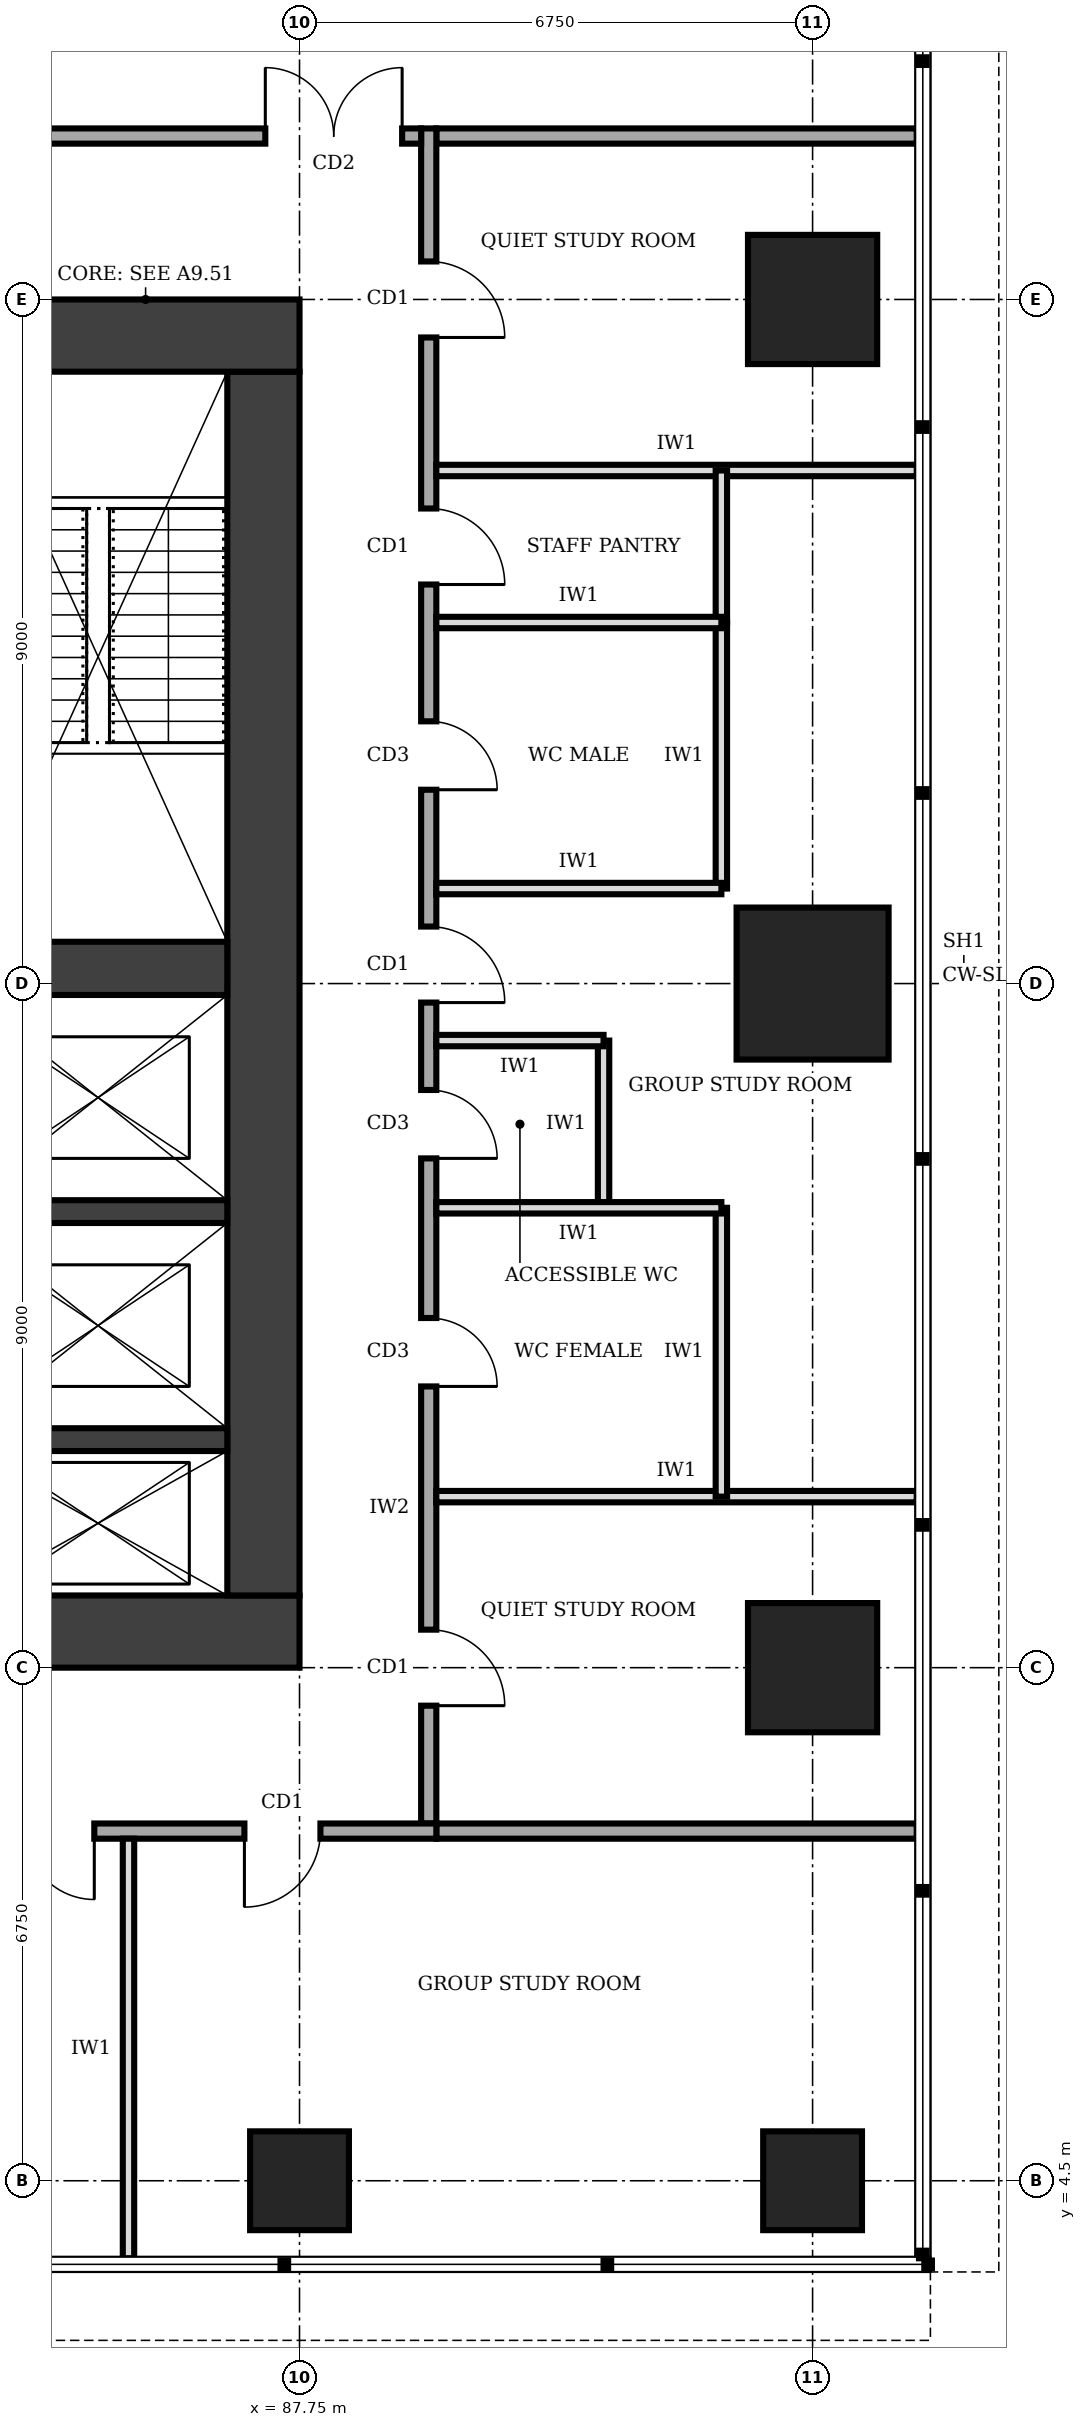
"""IFC4 building model, lengths in metres.
Left out: names, types, materials, properties, quantities, classifications, styles, units other than length and angle.
Written with IfcOpenShell. Run it as: python <this file> out.ifc"""

import sys

from ifc_helpers import new_model, si_unit, direction, frame, frame_2d, origin, origin_2d, place, context, subcontext, project, spatial, rectangle, extrude, element, fill, save


model = new_model("IFC4")
c1 = context("Model", 3, precision=1e-05, world=origin(), true_north=direction((0.0, 1.0)))
c2 = subcontext(c1, "Body", "Model", "MODEL_VIEW")
j1 = project(units=[si_unit("LENGTHUNIT", "METRE"), si_unit("PLANEANGLEUNIT", "RADIAN")], contexts=[c1])
p1 = place(None, origin())
s1 = spatial("IfcSite", under=j1, at=p1, CompositionType="ELEMENT")
p2 = place(p1, origin())
s2 = spatial("IfcBuilding", under=s1, at=p2, CompositionType="ELEMENT")
p3 = place(p2, frame((0.0, 0.0, 233.0)))
s3 = spatial("IfcBuildingStorey", under=s2, at=p3, CompositionType="ELEMENT", Elevation=233.0)
p4 = place(p3, frame((74.25, 11.725, 0.0), z_axis=(0.0, 0.0, 1.0), x_axis=(1.0, 0.0, 0.0)))
e1 = element("IfcWall", 1, at=p4, inside=s3, PredefinedType="SHEAR", context=c2, shape_type="SweptSolid", body=[
    extrude(rectangle(XDim=13.5, YDim=0.95, at=frame_2d((6.75, 0.0))), origin(), (0.0, 0.0, 1.0), 4.0),
])
p5 = place(p4, frame((4.75, 0.0, 0.0)))
e2 = element("IfcOpeningElement", 2, at=p5, cuts=e1, PredefinedType="OPENING", context=c2, shape_type="SweptSolid", body=[
    extrude(rectangle(XDim=1.0, YDim=2.1, at=frame_2d((0.5, 1.05))), frame((0.0, 0.485, 0.0), z_axis=(0.0, -1.0, 0.0), x_axis=(1.0, 0.0, 0.0)), (0.0, 0.0, 1.0), 0.97),
])
p6 = place(p3, frame((87.275, 12.2, 0.0), z_axis=(0.0, 0.0, 1.0), x_axis=(0.0, 1.0, 0.0)))
e3 = element("IfcWall", 3, at=p6, inside=s3, PredefinedType="SHEAR", context=c2, shape_type="SweptSolid", body=[
    extrude(rectangle(XDim=16.1, YDim=0.95, at=frame_2d((8.05, 0.0))), origin(), (0.0, 0.0, 1.0), 4.0),
])
p7 = place(p3, frame((87.75, 28.775, 0.0), z_axis=(0.0, 0.0, 1.0), x_axis=(-1.0, 0.0, 0.0)))
e4 = element("IfcWall", 4, at=p7, inside=s3, PredefinedType="SHEAR", context=c2, shape_type="SweptSolid", body=[
    extrude(rectangle(XDim=13.5, YDim=0.95, at=frame_2d((6.75, 0.0))), origin(), (0.0, 0.0, 1.0), 4.0),
])
p8 = place(p7, frame((4.75, 0.0, 0.0)))
e5 = element("IfcOpeningElement", 5, at=p8, cuts=e4, PredefinedType="OPENING", context=c2, shape_type="SweptSolid", body=[
    extrude(rectangle(XDim=1.8, YDim=2.1, at=frame_2d((0.9, 1.05))), frame((0.0, 0.485, 0.0), z_axis=(0.0, -1.0, 0.0), x_axis=(1.0, 0.0, 0.0)), (0.0, 0.0, 1.0), 0.97),
])
for number, where, z_axis, x_axis in (
    (6, (83.4, 14.25, 0.0), (0.0, 0.0, 1.0), (1.0, 0.0, 0.0)),
    (7, (83.4, 17.25, 0.0), (0.0, 0.0, 1.0), (1.0, 0.0, 0.0)),
):
    element("IfcWall", number, at=place(p3, frame(where, z_axis=z_axis, x_axis=x_axis)), inside=s3, PredefinedType="SHEAR", context=c2, shape_type="SweptSolid", body=[
        extrude(rectangle(XDim=3.4, YDim=0.3, at=frame_2d((1.7, 0.0))), origin(), (0.0, 0.0, 1.0), 4.0),
    ])
p9 = place(p3, frame((83.4, 20.45, 0.0), z_axis=(0.0, 0.0, 1.0), x_axis=(1.0, 0.0, 0.0)))
e8 = element("IfcWall", 8, at=p9, inside=s3, PredefinedType="SHEAR", context=c2, shape_type="SweptSolid", body=[
    extrude(rectangle(XDim=3.4, YDim=0.7, at=frame_2d((1.7, 0.0))), origin(), (0.0, 0.0, 1.0), 4.0),
])
for number, where, z_axis, x_axis in (
    (9, (87.75, 4.5, 0.0), (0.0, 0.0, 1.0), (1.0, 0.0, 0.0)),
    (10, (94.5, 4.5, 0.0), (0.0, 0.0, 1.0), (1.0, 0.0, 0.0)),
):
    element("IfcColumn", number, at=place(p3, frame(where, z_axis=z_axis, x_axis=x_axis)), inside=s3, PredefinedType="COLUMN", context=c2, shape_type="SweptSolid", body=[
        extrude(rectangle(XDim=1.3, YDim=1.3, at=origin_2d()), origin(), (0.0, 0.0, 1.0), 4.0),
    ])
p10 = place(p3, frame((94.5, 11.25, 0.0), z_axis=(0.0, 0.0, 1.0), x_axis=(1.0, 0.0, 0.0)))
e11 = element("IfcColumn", 11, at=p10, inside=s3, PredefinedType="COLUMN", context=c2, shape_type="SweptSolid", body=[
    extrude(rectangle(XDim=1.7, YDim=1.7, at=origin_2d()), origin(), (0.0, 0.0, 1.0), 4.0),
])
p11 = place(p3, frame((94.5, 20.25, 0.0), z_axis=(0.0, 0.0, 1.0), x_axis=(1.0, 0.0, 0.0)))
e12 = element("IfcColumn", 12, at=p11, inside=s3, PredefinedType="COLUMN", context=c2, shape_type="SweptSolid", body=[
    extrude(rectangle(XDim=2.0, YDim=2.0, at=origin_2d()), origin(), (0.0, 0.0, 1.0), 4.0),
])
p12 = place(p3, frame((94.5, 29.25, 0.0), z_axis=(0.0, 0.0, 1.0), x_axis=(1.0, 0.0, 0.0)))
e13 = element("IfcColumn", 13, at=p12, inside=s3, PredefinedType="COLUMN", context=c2, shape_type="SweptSolid", body=[
    extrude(rectangle(XDim=1.7, YDim=1.7, at=origin_2d()), origin(), (0.0, 0.0, 1.0), 4.0),
])
p13 = place(p3, frame((72.65, 9.1, 0.0), z_axis=(0.0, 0.0, 1.0), x_axis=(1.0, 0.0, 0.0)))
e14 = element("IfcWall", 14, at=p13, inside=s3, PredefinedType="SOLIDWALL", context=c2, shape_type="SweptSolid", body=[
    extrude(rectangle(XDim=16.9, YDim=0.2, at=frame_2d((8.45, 0.0))), origin(), (0.0, 0.0, 1.0), 3.75),
])
p14 = place(p13, frame((0.25, 0.0, 0.0)))
e15 = element("IfcOpeningElement", 15, at=p14, cuts=e14, PredefinedType="OPENING", context=c2, shape_type="SweptSolid", body=[
    extrude(rectangle(XDim=1.8, YDim=2.1, at=frame_2d((0.9, 1.05))), frame((0.0, 0.11, 0.0), z_axis=(0.0, -1.0, 0.0), x_axis=(1.0, 0.0, 0.0)), (0.0, 0.0, 1.0), 0.22),
])
p15 = place(p13, frame((10.6, 0.0, 0.0)))
e16 = element("IfcOpeningElement", 16, at=p15, cuts=e14, PredefinedType="OPENING", context=c2, shape_type="SweptSolid", body=[
    extrude(rectangle(XDim=1.8, YDim=2.1, at=frame_2d((0.9, 1.05))), frame((0.0, 0.11, 0.0), z_axis=(0.0, -1.0, 0.0), x_axis=(1.0, 0.0, 0.0)), (0.0, 0.0, 1.0), 0.22),
])
p16 = place(p13, frame((14.375, 0.0, 0.0)))
e17 = element("IfcOpeningElement", 17, at=p16, cuts=e14, PredefinedType="OPENING", context=c2, shape_type="SweptSolid", body=[
    extrude(rectangle(XDim=1.0, YDim=2.1, at=frame_2d((0.5, 1.05))), frame((0.0, 0.11, 0.0), z_axis=(0.0, -1.0, 0.0), x_axis=(1.0, 0.0, 0.0)), (0.0, 0.0, 1.0), 0.22),
])
p17 = place(p3, frame((89.45, 9.2, 0.0), z_axis=(0.0, 0.0, 1.0), x_axis=(0.0, 1.0, 0.0)))
e18 = element("IfcWall", 18, at=p17, inside=s3, PredefinedType="SOLIDWALL", context=c2, shape_type="SweptSolid", body=[
    extrude(rectangle(XDim=22.3, YDim=0.2, at=frame_2d((11.15, 0.0))), origin(), (0.0, 0.0, 1.0), 3.75),
])
p18 = place(p17, frame((1.55, 0.0, 0.0)))
e19 = element("IfcOpeningElement", 19, at=p18, cuts=e18, PredefinedType="OPENING", context=c2, shape_type="SweptSolid", body=[
    extrude(rectangle(XDim=1.0, YDim=2.1, at=frame_2d((0.5, 1.05))), frame((0.0, 0.11, 0.0), z_axis=(0.0, -1.0, 0.0), x_axis=(1.0, 0.0, 0.0)), (0.0, 0.0, 1.0), 0.22),
])
p19 = place(p17, frame((5.75, 0.0, 0.0)))
e20 = element("IfcOpeningElement", 20, at=p19, cuts=e18, PredefinedType="OPENING", context=c2, shape_type="SweptSolid", body=[
    extrude(rectangle(XDim=0.9, YDim=2.1, at=frame_2d((0.45, 1.05))), frame((0.0, 0.11, 0.0), z_axis=(0.0, -1.0, 0.0), x_axis=(1.0, 0.0, 0.0)), (0.0, 0.0, 1.0), 0.22),
])
p20 = place(p17, frame((8.75, 0.0, 0.0)))
e21 = element("IfcOpeningElement", 21, at=p20, cuts=e18, PredefinedType="OPENING", context=c2, shape_type="SweptSolid", body=[
    extrude(rectangle(XDim=0.9, YDim=2.1, at=frame_2d((0.45, 1.05))), frame((0.0, 0.11, 0.0), z_axis=(0.0, -1.0, 0.0), x_axis=(1.0, 0.0, 0.0)), (0.0, 0.0, 1.0), 0.22),
])
p21 = place(p17, frame((13.6, 0.0, 0.0)))
e22 = element("IfcOpeningElement", 22, at=p21, cuts=e18, PredefinedType="OPENING", context=c2, shape_type="SweptSolid", body=[
    extrude(rectangle(XDim=0.9, YDim=2.1, at=frame_2d((0.45, 1.05))), frame((0.0, 0.11, 0.0), z_axis=(0.0, -1.0, 0.0), x_axis=(1.0, 0.0, 0.0)), (0.0, 0.0, 1.0), 0.22),
])
p22 = place(p17, frame((16.3, 0.0, 0.0)))
e23 = element("IfcOpeningElement", 23, at=p22, cuts=e18, PredefinedType="OPENING", context=c2, shape_type="SweptSolid", body=[
    extrude(rectangle(XDim=1.0, YDim=2.1, at=frame_2d((0.5, 1.05))), frame((0.0, 0.11, 0.0), z_axis=(0.0, -1.0, 0.0), x_axis=(1.0, 0.0, 0.0)), (0.0, 0.0, 1.0), 0.22),
])
p23 = place(p17, frame((10.8, 0.0, 0.0)))
e24 = element("IfcOpeningElement", 24, at=p23, cuts=e18, PredefinedType="OPENING", context=c2, shape_type="SweptSolid", body=[
    extrude(rectangle(XDim=1.0, YDim=2.1, at=frame_2d((0.5, 1.05))), frame((0.0, 0.11, 0.0), z_axis=(0.0, -1.0, 0.0), x_axis=(1.0, 0.0, 0.0)), (0.0, 0.0, 1.0), 0.22),
])
p24 = place(p17, frame((19.55, 0.0, 0.0)))
e25 = element("IfcOpeningElement", 25, at=p24, cuts=e18, PredefinedType="OPENING", context=c2, shape_type="SweptSolid", body=[
    extrude(rectangle(XDim=1.0, YDim=2.1, at=frame_2d((0.5, 1.05))), frame((0.0, 0.11, 0.0), z_axis=(0.0, -1.0, 0.0), x_axis=(1.0, 0.0, 0.0)), (0.0, 0.0, 1.0), 0.22),
])
p25 = place(p3, frame((89.35, 31.4, 0.0), z_axis=(0.0, 0.0, 1.0), x_axis=(-1.0, 0.0, 0.0)))
e26 = element("IfcWall", 26, at=p25, inside=s3, PredefinedType="SOLIDWALL", context=c2, shape_type="SweptSolid", body=[
    extrude(rectangle(XDim=16.9, YDim=0.2, at=frame_2d((8.45, 0.0))), origin(), (0.0, 0.0, 1.0), 3.75),
])
p26 = place(p25, frame((14.375, 0.0, 0.0)))
e27 = element("IfcOpeningElement", 27, at=p26, cuts=e26, PredefinedType="OPENING", context=c2, shape_type="SweptSolid", body=[
    extrude(rectangle(XDim=1.0, YDim=2.1, at=frame_2d((0.5, 1.05))), frame((0.0, 0.11, 0.0), z_axis=(0.0, -1.0, 0.0), x_axis=(1.0, 0.0, 0.0)), (0.0, 0.0, 1.0), 0.22),
])
p27 = place(p25, frame((10.6, 0.0, 0.0)))
e28 = element("IfcOpeningElement", 28, at=p27, cuts=e26, PredefinedType="OPENING", context=c2, shape_type="SweptSolid", body=[
    extrude(rectangle(XDim=1.8, YDim=2.1, at=frame_2d((0.9, 1.05))), frame((0.0, 0.11, 0.0), z_axis=(0.0, -1.0, 0.0), x_axis=(1.0, 0.0, 0.0)), (0.0, 0.0, 1.0), 0.22),
])
p28 = place(p25, frame((0.25, 0.0, 0.0)))
e29 = element("IfcOpeningElement", 29, at=p28, cuts=e26, PredefinedType="OPENING", context=c2, shape_type="SweptSolid", body=[
    extrude(rectangle(XDim=1.8, YDim=2.1, at=frame_2d((0.9, 1.05))), frame((0.0, 0.11, 0.0), z_axis=(0.0, -1.0, 0.0), x_axis=(1.0, 0.0, 0.0)), (0.0, 0.0, 1.0), 0.22),
])
for number, where, z_axis, x_axis in (
    (30, (89.55, 9.1, 0.0), (0.0, 0.0, 1.0), (1.0, 0.0, 0.0)),
    (31, (89.55, 31.4, 0.0), (0.0, 0.0, 1.0), (1.0, 0.0, 0.0)),
):
    element("IfcWall", number, at=place(p3, frame(where, z_axis=z_axis, x_axis=x_axis)), inside=s3, PredefinedType="SOLIDWALL", context=c2, shape_type="SweptSolid", body=[
        extrude(rectangle(XDim=6.32, YDim=0.2, at=frame_2d((3.16, 0.0))), origin(), (0.0, 0.0, 1.0), 3.75),
    ])
p29 = place(p3, frame((85.5, 3.48, 0.0), z_axis=(0.0, 0.0, 1.0), x_axis=(0.0, 1.0, 0.0)))
e32 = element("IfcWall", 32, at=p29, inside=s3, PredefinedType="PARTITIONING", context=c2, shape_type="SweptSolid", body=[
    extrude(rectangle(XDim=5.52, YDim=0.15, at=frame_2d((2.76, 0.0))), origin(), (0.0, 0.0, 1.0), 3.75),
])
for number, where, z_axis, x_axis in (
    (33, (89.55, 13.5, 0.0), (0.0, 0.0, 1.0), (1.0, 0.0, 0.0)),
    (34, (89.55, 27.0, 0.0), (0.0, 0.0, 1.0), (1.0, 0.0, 0.0)),
):
    element("IfcWall", number, at=place(p3, frame(where, z_axis=z_axis, x_axis=x_axis)), inside=s3, PredefinedType="PARTITIONING", context=c2, shape_type="SweptSolid", body=[
        extrude(rectangle(XDim=6.32, YDim=0.15, at=frame_2d((3.16, 0.0))), origin(), (0.0, 0.0, 1.0), 3.75),
    ])
p30 = place(p3, frame((89.55, 17.3, 0.0), z_axis=(0.0, 0.0, 1.0), x_axis=(1.0, 0.0, 0.0)))
e35 = element("IfcWall", 35, at=p30, inside=s3, PredefinedType="PARTITIONING", context=c2, shape_type="SweptSolid", body=[
    extrude(rectangle(XDim=3.75, YDim=0.15, at=frame_2d((1.875, 0.0))), origin(), (0.0, 0.0, 1.0), 3.75),
])
p31 = place(p3, frame((89.55, 19.5, 0.0), z_axis=(0.0, 0.0, 1.0), x_axis=(1.0, 0.0, 0.0)))
e36 = element("IfcWall", 36, at=p31, inside=s3, PredefinedType="PARTITIONING", context=c2, shape_type="SweptSolid", body=[
    extrude(rectangle(XDim=2.2, YDim=0.15, at=frame_2d((1.1, 0.0))), origin(), (0.0, 0.0, 1.0), 2.85),
])
for number, where, z_axis, x_axis in (
    (37, (89.55, 21.5, 0.0), (0.0, 0.0, 1.0), (1.0, 0.0, 0.0)),
    (38, (89.55, 25.0, 0.0), (0.0, 0.0, 1.0), (1.0, 0.0, 0.0)),
):
    element("IfcWall", number, at=place(p3, frame(where, z_axis=z_axis, x_axis=x_axis)), inside=s3, PredefinedType="PARTITIONING", context=c2, shape_type="SweptSolid", body=[
        extrude(rectangle(XDim=3.75, YDim=0.15, at=frame_2d((1.875, 0.0))), origin(), (0.0, 0.0, 1.0), 3.75),
    ])
p32 = place(p3, frame((93.3, 13.5, 0.0), z_axis=(0.0, 0.0, 1.0), x_axis=(0.0, 1.0, 0.0)))
e39 = element("IfcWall", 39, at=p32, inside=s3, PredefinedType="PARTITIONING", context=c2, shape_type="SweptSolid", body=[
    extrude(rectangle(XDim=3.8, YDim=0.15, at=frame_2d((1.9, 0.0))), origin(), (0.0, 0.0, 1.0), 3.75),
])
p33 = place(p3, frame((91.75, 17.3, 0.0), z_axis=(0.0, 0.0, 1.0), x_axis=(0.0, 1.0, 0.0)))
e40 = element("IfcWall", 40, at=p33, inside=s3, PredefinedType="PARTITIONING", context=c2, shape_type="SweptSolid", body=[
    extrude(rectangle(XDim=2.2, YDim=0.15, at=frame_2d((1.1, 0.0))), origin(), (0.0, 0.0, 1.0), 3.75),
])
p34 = place(p3, frame((93.3, 21.5, 0.0), z_axis=(0.0, 0.0, 1.0), x_axis=(0.0, 1.0, 0.0)))
e41 = element("IfcWall", 41, at=p34, inside=s3, PredefinedType="PARTITIONING", context=c2, shape_type="SweptSolid", body=[
    extrude(rectangle(XDim=3.5, YDim=0.15, at=frame_2d((1.75, 0.0))), origin(), (0.0, 0.0, 1.0), 3.75),
])
p35 = place(p3, frame((93.3, 25.0, 0.0), z_axis=(0.0, 0.0, 1.0), x_axis=(0.0, 1.0, 0.0)))
e42 = element("IfcWall", 42, at=p35, inside=s3, PredefinedType="PARTITIONING", context=c2, shape_type="SweptSolid", body=[
    extrude(rectangle(XDim=2.0, YDim=0.15, at=frame_2d((1.0, 0.0))), origin(), (0.0, 0.0, 1.0), 3.75),
])
p36 = place(p15, frame((1.8, 0.0, 0.0), z_axis=(0.0, 0.0, 1.0), x_axis=(-1.0, 0.0, 0.0)))
e43 = element("IfcDoor", 43, at=p36, inside=s3, OperationType="DOUBLE_DOOR_SINGLE_SWING", PredefinedType="DOOR", context=c2, shape_type="SweptSolid", body=[
    extrude(rectangle(XDim=1.8, YDim=2.1, at=frame_2d((0.9, 1.05))), frame((0.0, 0.025, 0.0), z_axis=(0.0, -1.0, 0.0), x_axis=(1.0, 0.0, 0.0)), (0.0, 0.0, 1.0), 0.05),
])
fill(e16, e43)
p37 = place(p16, frame((1.0, 0.0, 0.0), z_axis=(0.0, 0.0, 1.0), x_axis=(-1.0, 0.0, 0.0)))
e44 = element("IfcDoor", 44, at=p37, inside=s3, OperationType="SINGLE_SWING_RIGHT", PredefinedType="DOOR", context=c2, shape_type="SweptSolid", body=[
    extrude(rectangle(XDim=1.0, YDim=2.1, at=frame_2d((0.5, 1.05))), frame((0.0, 0.025, 0.0), z_axis=(0.0, -1.0, 0.0), x_axis=(1.0, 0.0, 0.0)), (0.0, 0.0, 1.0), 0.05),
])
fill(e17, e44)
p38 = place(p18, frame((1.0, 0.0, 0.0), z_axis=(0.0, 0.0, 1.0), x_axis=(-1.0, 0.0, 0.0)))
e45 = element("IfcDoor", 45, at=p38, inside=s3, OperationType="SINGLE_SWING_RIGHT", PredefinedType="DOOR", context=c2, shape_type="SweptSolid", body=[
    extrude(rectangle(XDim=1.0, YDim=2.1, at=frame_2d((0.5, 1.05))), frame((0.0, 0.025, 0.0), z_axis=(0.0, -1.0, 0.0), x_axis=(1.0, 0.0, 0.0)), (0.0, 0.0, 1.0), 0.05),
])
fill(e19, e45)
p39 = place(p19, frame((0.9, 0.0, 0.0), z_axis=(0.0, 0.0, 1.0), x_axis=(-1.0, 0.0, 0.0)))
e46 = element("IfcDoor", 46, at=p39, inside=s3, OperationType="SINGLE_SWING_RIGHT", PredefinedType="DOOR", context=c2, shape_type="SweptSolid", body=[
    extrude(rectangle(XDim=0.9, YDim=2.1, at=frame_2d((0.45, 1.05))), frame((0.0, 0.025, 0.0), z_axis=(0.0, -1.0, 0.0), x_axis=(1.0, 0.0, 0.0)), (0.0, 0.0, 1.0), 0.05),
])
fill(e20, e46)
p40 = place(p20, frame((0.9, 0.0, 0.0), z_axis=(0.0, 0.0, 1.0), x_axis=(-1.0, 0.0, 0.0)))
e47 = element("IfcDoor", 47, at=p40, inside=s3, OperationType="SINGLE_SWING_RIGHT", PredefinedType="DOOR", context=c2, shape_type="SweptSolid", body=[
    extrude(rectangle(XDim=0.9, YDim=2.1, at=frame_2d((0.45, 1.05))), frame((0.0, 0.025, 0.0), z_axis=(0.0, -1.0, 0.0), x_axis=(1.0, 0.0, 0.0)), (0.0, 0.0, 1.0), 0.05),
])
fill(e21, e47)
p41 = place(p21, frame((0.9, 0.0, 0.0), z_axis=(0.0, 0.0, 1.0), x_axis=(-1.0, 0.0, 0.0)))
e48 = element("IfcDoor", 48, at=p41, inside=s3, OperationType="SINGLE_SWING_RIGHT", PredefinedType="DOOR", context=c2, shape_type="SweptSolid", body=[
    extrude(rectangle(XDim=0.9, YDim=2.1, at=frame_2d((0.45, 1.05))), frame((0.0, 0.025, 0.0), z_axis=(0.0, -1.0, 0.0), x_axis=(1.0, 0.0, 0.0)), (0.0, 0.0, 1.0), 0.05),
])
fill(e22, e48)
p42 = place(p22, frame((1.0, 0.0, 0.0), z_axis=(0.0, 0.0, 1.0), x_axis=(-1.0, 0.0, 0.0)))
e49 = element("IfcDoor", 49, at=p42, inside=s3, OperationType="SINGLE_SWING_RIGHT", PredefinedType="DOOR", context=c2, shape_type="SweptSolid", body=[
    extrude(rectangle(XDim=1.0, YDim=2.1, at=frame_2d((0.5, 1.05))), frame((0.0, 0.025, 0.0), z_axis=(0.0, -1.0, 0.0), x_axis=(1.0, 0.0, 0.0)), (0.0, 0.0, 1.0), 0.05),
])
fill(e23, e49)
p43 = place(p23, frame((1.0, 0.0, 0.0), z_axis=(0.0, 0.0, 1.0), x_axis=(-1.0, 0.0, 0.0)))
e50 = element("IfcDoor", 50, at=p43, inside=s3, OperationType="SINGLE_SWING_RIGHT", PredefinedType="DOOR", context=c2, shape_type="SweptSolid", body=[
    extrude(rectangle(XDim=1.0, YDim=2.1, at=frame_2d((0.5, 1.05))), frame((0.0, 0.025, 0.0), z_axis=(0.0, -1.0, 0.0), x_axis=(1.0, 0.0, 0.0)), (0.0, 0.0, 1.0), 0.05),
])
fill(e24, e50)
p44 = place(p24, frame((1.0, 0.0, 0.0), z_axis=(0.0, 0.0, 1.0), x_axis=(-1.0, 0.0, 0.0)))
e51 = element("IfcDoor", 51, at=p44, inside=s3, OperationType="SINGLE_SWING_RIGHT", PredefinedType="DOOR", context=c2, shape_type="SweptSolid", body=[
    extrude(rectangle(XDim=1.0, YDim=2.1, at=frame_2d((0.5, 1.05))), frame((0.0, 0.025, 0.0), z_axis=(0.0, -1.0, 0.0), x_axis=(1.0, 0.0, 0.0)), (0.0, 0.0, 1.0), 0.05),
])
fill(e25, e51)
p45 = place(p28, frame((1.8, 0.0, 0.0), z_axis=(0.0, 0.0, 1.0), x_axis=(-1.0, 0.0, 0.0)))
e52 = element("IfcDoor", 52, at=p45, inside=s3, OperationType="DOUBLE_DOOR_SINGLE_SWING", PredefinedType="DOOR", context=c2, shape_type="SweptSolid", body=[
    extrude(rectangle(XDim=1.8, YDim=2.1, at=frame_2d((0.9, 1.05))), frame((0.0, 0.025, 0.0), z_axis=(0.0, -1.0, 0.0), x_axis=(1.0, 0.0, 0.0)), (0.0, 0.0, 1.0), 0.05),
])
fill(e29, e52)
save(model, sys.argv[1])
